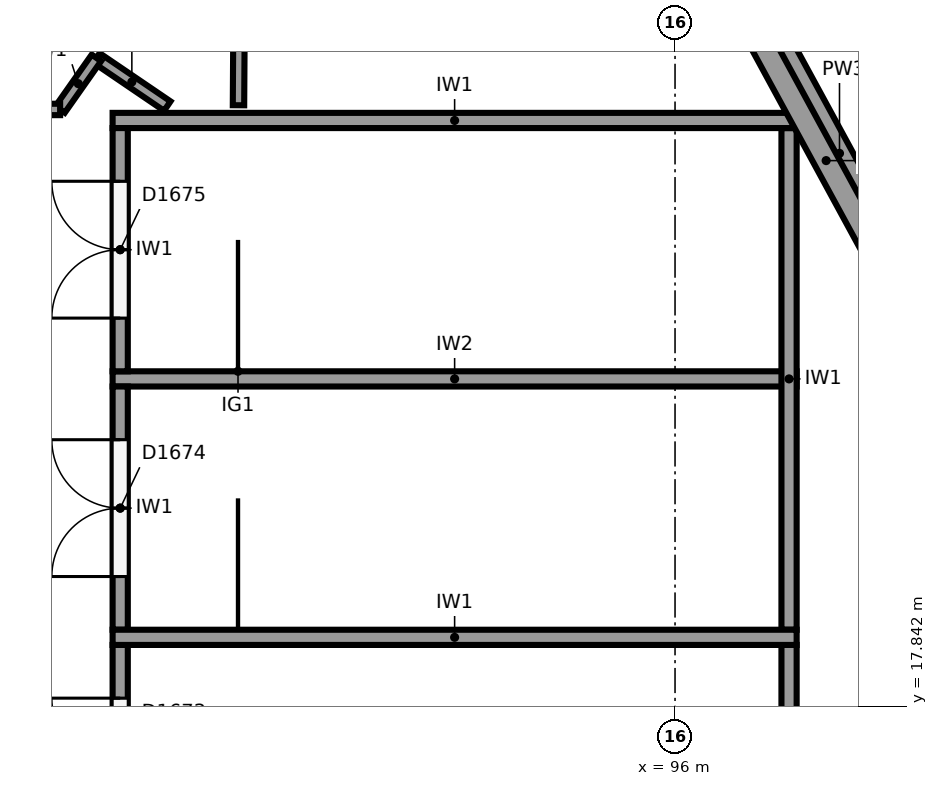
"""IFC4 building model, lengths in metres.
Left out: names, types, materials, properties, quantities, classifications, styles, units other than length and angle.
Written with IfcOpenShell. Run it as: python <this file> out.ifc"""

import sys

from ifc_helpers import new_model, si_unit, direction, frame, frame_2d, origin, place, context, subcontext, project, spatial, polyline, rectangle, outline, extrude, element, fill, save


model = new_model("IFC4")
c1 = context("Model", 3, precision=1e-05, world=origin(), true_north=direction((0.0, 1.0)))
c2 = subcontext(c1, "Body", "Model", "MODEL_VIEW")
j1 = project(units=[si_unit("LENGTHUNIT", "METRE"), si_unit("PLANEANGLEUNIT", "RADIAN")], contexts=[c1])
p1 = place(None, origin())
s1 = spatial("IfcSite", under=j1, at=p1, CompositionType="ELEMENT")
p2 = place(p1, origin())
s2 = spatial("IfcBuilding", under=s1, at=p2, CompositionType="ELEMENT")
p3 = place(p2, frame((0.0, 0.0, 24.0)))
s3 = spatial("IfcBuildingStorey", under=s2, at=p3, CompositionType="ELEMENT", Elevation=24.0)
p4 = place(p3, frame((101.337, 18.215, 0.0), z_axis=(0.0, 0.0, 1.0), x_axis=(-0.477865020076, -0.878433277255, 0.0)))
e1 = element("IfcWall", 1, at=p4, inside=s3, PredefinedType="SOLIDWALL", context=c2, shape_type="SweptSolid", body=[
    extrude(rectangle(XDim=7.28, YDim=0.32, at=frame_2d((3.64, 0.0))), origin(), (0.0, 0.0, 1.0), 6.0),
])
p5 = place(p4, frame((1.13, 0.0, 1.0)))
e2 = element("IfcOpeningElement", 2, at=p5, cuts=e1, PredefinedType="OPENING", context=c2, shape_type="SweptSolid", body=[
    extrude(rectangle(XDim=0.9, YDim=3.25, at=frame_2d((0.45, 1.625))), frame((0.0, 0.17, 0.0), z_axis=(0.0, -1.0, 0.0), x_axis=(1.0, 0.0, 0.0)), (0.0, 0.0, 1.0), 0.34),
])
p6 = place(p3, frame((101.337, 18.215, 6.0), z_axis=(0.0, 0.0, 1.0), x_axis=(-0.477865020076, -0.878433277255, 0.0)))
e3 = element("IfcWall", 3, at=p6, inside=s3, PredefinedType="SOLIDWALL", context=c2, shape_type="SweptSolid", body=[
    extrude(outline(polyline([(0.0, 0.0), (7.28, 0.0), (7.28, 6.972), (0.0, 10.451), (0.0, 0.0)])), frame((0.0, 0.16, 0.0), z_axis=(0.0, -1.0, 0.0), x_axis=(1.0, 0.0, 0.0)), (0.0, 0.0, 1.0), 0.32),
])
p7 = place(p6, frame((1.13, 0.0, 1.6)))
e4 = element("IfcOpeningElement", 4, at=p7, cuts=e3, PredefinedType="OPENING", context=c2, shape_type="SweptSolid", body=[
    extrude(rectangle(XDim=0.9, YDim=3.0, at=frame_2d((0.45, 1.5))), frame((0.0, 0.17, 0.0), z_axis=(0.0, -1.0, 0.0), x_axis=(1.0, 0.0, 0.0)), (0.0, 0.0, 1.0), 0.34),
])
p8 = place(p3, frame((94.815, 30.855, 0.0), z_axis=(0.0, 0.0, 1.0), x_axis=(0.477867771117, -0.878431780691, 0.0)))
e5 = element("IfcWall", 5, at=p8, inside=s3, PredefinedType="SOLIDWALL", context=c2, shape_type="SweptSolid", body=[
    extrude(rectangle(XDim=13.28, YDim=0.32, at=frame_2d((6.64, 0.0))), origin(), (0.0, 0.0, 1.0), 6.0),
])
p9 = place(p8, frame((0.75, 0.0, 1.0)))
e6 = element("IfcOpeningElement", 6, at=p9, cuts=e5, PredefinedType="OPENING", context=c2, shape_type="SweptSolid", body=[
    extrude(rectangle(XDim=0.9, YDim=3.25, at=frame_2d((0.45, 1.625))), frame((0.0, 0.17, 0.0), z_axis=(0.0, -1.0, 0.0), x_axis=(1.0, 0.0, 0.0)), (0.0, 0.0, 1.0), 0.34),
])
p10 = place(p8, frame((2.85, 0.0, 1.0)))
e7 = element("IfcOpeningElement", 7, at=p10, cuts=e5, PredefinedType="OPENING", context=c2, shape_type="SweptSolid", body=[
    extrude(rectangle(XDim=0.9, YDim=3.25, at=frame_2d((0.45, 1.625))), frame((0.0, 0.17, 0.0), z_axis=(0.0, -1.0, 0.0), x_axis=(1.0, 0.0, 0.0)), (0.0, 0.0, 1.0), 0.34),
])
p11 = place(p8, frame((11.25, 0.0, 1.0)))
e8 = element("IfcOpeningElement", 8, at=p11, cuts=e5, PredefinedType="OPENING", context=c2, shape_type="SweptSolid", body=[
    extrude(rectangle(XDim=0.9, YDim=3.25, at=frame_2d((0.45, 1.625))), frame((0.0, 0.17, 0.0), z_axis=(0.0, -1.0, 0.0), x_axis=(1.0, 0.0, 0.0)), (0.0, 0.0, 1.0), 0.34),
])
p12 = place(p3, frame((94.991, 30.95, 6.0), z_axis=(0.0, 0.0, 1.0), x_axis=(0.477867771117, -0.878431780691, 0.0)))
e9 = element("IfcWall", 9, at=p12, inside=s3, PredefinedType="SOLIDWALL", context=c2, shape_type="SweptSolid", body=[
    extrude(outline(polyline([(0.0, 0.0), (13.28, 0.0), (13.28, 10.451), (0.0, 4.105), (0.0, 0.0)])), frame((0.0, 0.16, 0.0), z_axis=(0.0, -1.0, 0.0), x_axis=(1.0, 0.0, 0.0)), (0.0, 0.0, 1.0), 0.32),
])
p13 = place(p12, frame((2.85, 0.0, 1.6)))
e10 = element("IfcOpeningElement", 10, at=p13, cuts=e9, PredefinedType="OPENING", context=c2, shape_type="SweptSolid", body=[
    extrude(rectangle(XDim=0.9, YDim=3.0, at=frame_2d((0.45, 1.5))), frame((0.0, 0.17, 0.0), z_axis=(0.0, -1.0, 0.0), x_axis=(1.0, 0.0, 0.0)), (0.0, 0.0, 1.0), 0.34),
])
p14 = place(p12, frame((11.25, 0.0, 1.6)))
e11 = element("IfcOpeningElement", 11, at=p14, cuts=e9, PredefinedType="OPENING", context=c2, shape_type="SweptSolid", body=[
    extrude(rectangle(XDim=0.9, YDim=3.0, at=frame_2d((0.45, 1.5))), frame((0.0, 0.17, 0.0), z_axis=(0.0, -1.0, 0.0), x_axis=(1.0, 0.0, 0.0)), (0.0, 0.0, 1.0), 0.34),
])
for number, where, z_axis, x_axis in (
    (12, (97.6, 18.75, 0.0), (0.0, 0.0, 1.0), (-1.0, 0.0, 0.0)),
    (13, (97.6, 25.55, 0.0), (0.0, 0.0, 1.0), (-1.0, 0.0, 0.0)),
):
    element("IfcWall", number, at=place(p3, frame(where, z_axis=z_axis, x_axis=x_axis)), inside=s3, PredefinedType="SHEAR", context=c2, shape_type="SweptSolid", body=[
        extrude(rectangle(XDim=9.0, YDim=0.2, at=frame_2d((4.5, 0.0))), origin(), (0.0, 0.0, 1.0), 5.75),
    ])
for number, where, z_axis, x_axis in (
    (14, (97.5, 12.05, 0.0), (0.0, 0.0, 1.0), (0.0, 1.0, 0.0)),
    (15, (97.5, 18.85, 0.0), (0.0, 0.0, 1.0), (0.0, 1.0, 0.0)),
):
    element("IfcWall", number, at=place(p3, frame(where, z_axis=z_axis, x_axis=x_axis)), inside=s3, PredefinedType="SHEAR", context=c2, shape_type="SweptSolid", body=[
        extrude(rectangle(XDim=6.6, YDim=0.2, at=frame_2d((3.3, 0.0))), origin(), (0.0, 0.0, 1.0), 5.75),
    ])
p15 = place(p3, frame((97.6, 22.15, 0.0), z_axis=(0.0, 0.0, 1.0), x_axis=(-1.0, 0.0, 0.0)))
e16 = element("IfcWall", 16, at=p15, inside=s3, PredefinedType="SHEAR", context=c2, shape_type="SweptSolid", body=[
    extrude(rectangle(XDim=9.0, YDim=0.2, at=frame_2d((4.5, 0.0))), origin(), (0.0, 0.0, 1.0), 5.75),
])
p16 = place(p3, frame((88.7, 15.45, 0.0), z_axis=(0.0, 0.0, 1.0), x_axis=(0.0, 1.0, 0.0)))
e17 = element("IfcWall", 17, at=p16, inside=s3, PredefinedType="SHEAR", context=c2, shape_type="SweptSolid", body=[
    extrude(rectangle(XDim=3.2, YDim=0.2, at=frame_2d((1.6, 0.0))), origin(), (0.0, 0.0, 1.0), 5.75),
])
p17 = place(p16, frame((0.7, 0.0, 0.0)))
e18 = element("IfcOpeningElement", 18, at=p17, cuts=e17, PredefinedType="OPENING", context=c2, shape_type="SweptSolid", body=[
    extrude(rectangle(XDim=1.8, YDim=2.1, at=frame_2d((0.9, 1.05))), frame((0.0, 0.11, 0.0), z_axis=(0.0, -1.0, 0.0), x_axis=(1.0, 0.0, 0.0)), (0.0, 0.0, 1.0), 0.22),
])
p18 = place(p3, frame((88.7, 18.85, 0.0), z_axis=(0.0, 0.0, 1.0), x_axis=(0.0, 1.0, 0.0)))
e19 = element("IfcWall", 19, at=p18, inside=s3, PredefinedType="SHEAR", context=c2, shape_type="SweptSolid", body=[
    extrude(rectangle(XDim=3.2, YDim=0.2, at=frame_2d((1.6, 0.0))), origin(), (0.0, 0.0, 1.0), 5.75),
])
p19 = place(p18, frame((0.7, 0.0, 0.0)))
e20 = element("IfcOpeningElement", 20, at=p19, cuts=e19, PredefinedType="OPENING", context=c2, shape_type="SweptSolid", body=[
    extrude(rectangle(XDim=1.8, YDim=2.1, at=frame_2d((0.9, 1.05))), frame((0.0, 0.11, 0.0), z_axis=(0.0, -1.0, 0.0), x_axis=(1.0, 0.0, 0.0)), (0.0, 0.0, 1.0), 0.22),
])
p20 = place(p3, frame((88.7, 22.25, 0.0), z_axis=(0.0, 0.0, 1.0), x_axis=(0.0, 1.0, 0.0)))
e21 = element("IfcWall", 21, at=p20, inside=s3, PredefinedType="SHEAR", context=c2, shape_type="SweptSolid", body=[
    extrude(rectangle(XDim=3.2, YDim=0.2, at=frame_2d((1.6, 0.0))), origin(), (0.0, 0.0, 1.0), 5.75),
])
p21 = place(p20, frame((0.7, 0.0, 0.0)))
e22 = element("IfcOpeningElement", 22, at=p21, cuts=e21, PredefinedType="OPENING", context=c2, shape_type="SweptSolid", body=[
    extrude(rectangle(XDim=1.8, YDim=2.1, at=frame_2d((0.9, 1.05))), frame((0.0, 0.11, 0.0), z_axis=(0.0, -1.0, 0.0), x_axis=(1.0, 0.0, 0.0)), (0.0, 0.0, 1.0), 0.22),
])
p22 = place(p3, frame((90.256, 25.75, 0.0), z_axis=(0.0, 0.0, 1.0), x_axis=(0.006329633282, 0.999979967671, 0.0)))
e23 = element("IfcWall", 23, at=p22, inside=s3, PredefinedType="PARTITIONING", context=c2, shape_type="SweptSolid", body=[
    extrude(rectangle(XDim=4.783, YDim=0.15, at=frame_2d((2.391, 0.0))), origin(), (0.0, 0.0, 1.0), 5.4),
])
p23 = place(p22, frame((1.95, 0.0, 0.0)))
e24 = element("IfcOpeningElement", 24, at=p23, cuts=e23, PredefinedType="OPENING", context=c2, shape_type="SweptSolid", body=[
    extrude(rectangle(XDim=1.0, YDim=2.1, at=frame_2d((0.5, 1.05))), frame((0.0, 0.085, 0.0), z_axis=(0.0, -1.0, 0.0), x_axis=(1.0, 0.0, 0.0)), (0.0, 0.0, 1.0), 0.17),
])
p24 = place(p3, frame((89.32, 25.74, 0.0), z_axis=(0.0, 0.0, 1.0), x_axis=(-0.827055308354, 0.562120553728, 0.0)))
e25 = element("IfcWall", 25, at=p24, inside=s3, PredefinedType="PARTITIONING", context=c2, shape_type="SweptSolid", body=[
    extrude(rectangle(XDim=1.128, YDim=0.15, at=frame_2d((0.564, 0.0))), origin(), (0.0, 0.0, 1.0), 5.4),
])
p25 = place(p3, frame((88.387, 26.374, 0.0), z_axis=(0.0, 0.0, 1.0), x_axis=(-0.575376756214, -0.817888493872, 0.0)))
e26 = element("IfcWall", 26, at=p25, inside=s3, PredefinedType="PARTITIONING", context=c2, shape_type="SweptSolid", body=[
    extrude(rectangle(XDim=0.83, YDim=0.15, at=frame_2d((0.415, 0.0))), origin(), (0.0, 0.0, 1.0), 5.4),
])
p26 = place(p3, frame((87.909, 25.695, 0.0), z_axis=(0.0, 0.0, 1.0), x_axis=(-1.0, 0.0, 0.0)))
e27 = element("IfcWall", 27, at=p26, inside=s3, PredefinedType="PARTITIONING", context=c2, shape_type="SweptSolid", body=[
    extrude(rectangle(XDim=3.704, YDim=0.15, at=frame_2d((1.852, 0.0))), origin(), (0.0, 0.0, 1.0), 5.4),
])
p27 = place(p26, frame((0.65, 0.0, 0.0)))
e28 = element("IfcOpeningElement", 28, at=p27, cuts=e27, PredefinedType="OPENING", context=c2, shape_type="SweptSolid", body=[
    extrude(rectangle(XDim=1.8, YDim=2.1, at=frame_2d((0.9, 1.05))), frame((0.0, 0.085, 0.0), z_axis=(0.0, -1.0, 0.0), x_axis=(1.0, 0.0, 0.0)), (0.0, 0.0, 1.0), 0.17),
])
p28 = place(p17, origin())
e29 = element("IfcDoor", 29, at=p28, inside=s3, OperationType="DOUBLE_DOOR_SINGLE_SWING", PredefinedType="DOOR", context=c2, shape_type="SweptSolid", body=[
    extrude(rectangle(XDim=1.8, YDim=2.1, at=frame_2d((0.9, 1.05))), frame((0.0, 0.025, 0.0), z_axis=(0.0, -1.0, 0.0), x_axis=(1.0, 0.0, 0.0)), (0.0, 0.0, 1.0), 0.05),
])
fill(e18, e29)
p29 = place(p19, origin())
e30 = element("IfcDoor", 30, at=p29, inside=s3, OperationType="DOUBLE_DOOR_SINGLE_SWING", PredefinedType="DOOR", context=c2, shape_type="SweptSolid", body=[
    extrude(rectangle(XDim=1.8, YDim=2.1, at=frame_2d((0.9, 1.05))), frame((0.0, 0.025, 0.0), z_axis=(0.0, -1.0, 0.0), x_axis=(1.0, 0.0, 0.0)), (0.0, 0.0, 1.0), 0.05),
])
fill(e20, e30)
p30 = place(p21, origin())
e31 = element("IfcDoor", 31, at=p30, inside=s3, OperationType="DOUBLE_DOOR_SINGLE_SWING", PredefinedType="DOOR", context=c2, shape_type="SweptSolid", body=[
    extrude(rectangle(XDim=1.8, YDim=2.1, at=frame_2d((0.9, 1.05))), frame((0.0, 0.025, 0.0), z_axis=(0.0, -1.0, 0.0), x_axis=(1.0, 0.0, 0.0)), (0.0, 0.0, 1.0), 0.05),
])
fill(e22, e31)
save(model, sys.argv[1])
